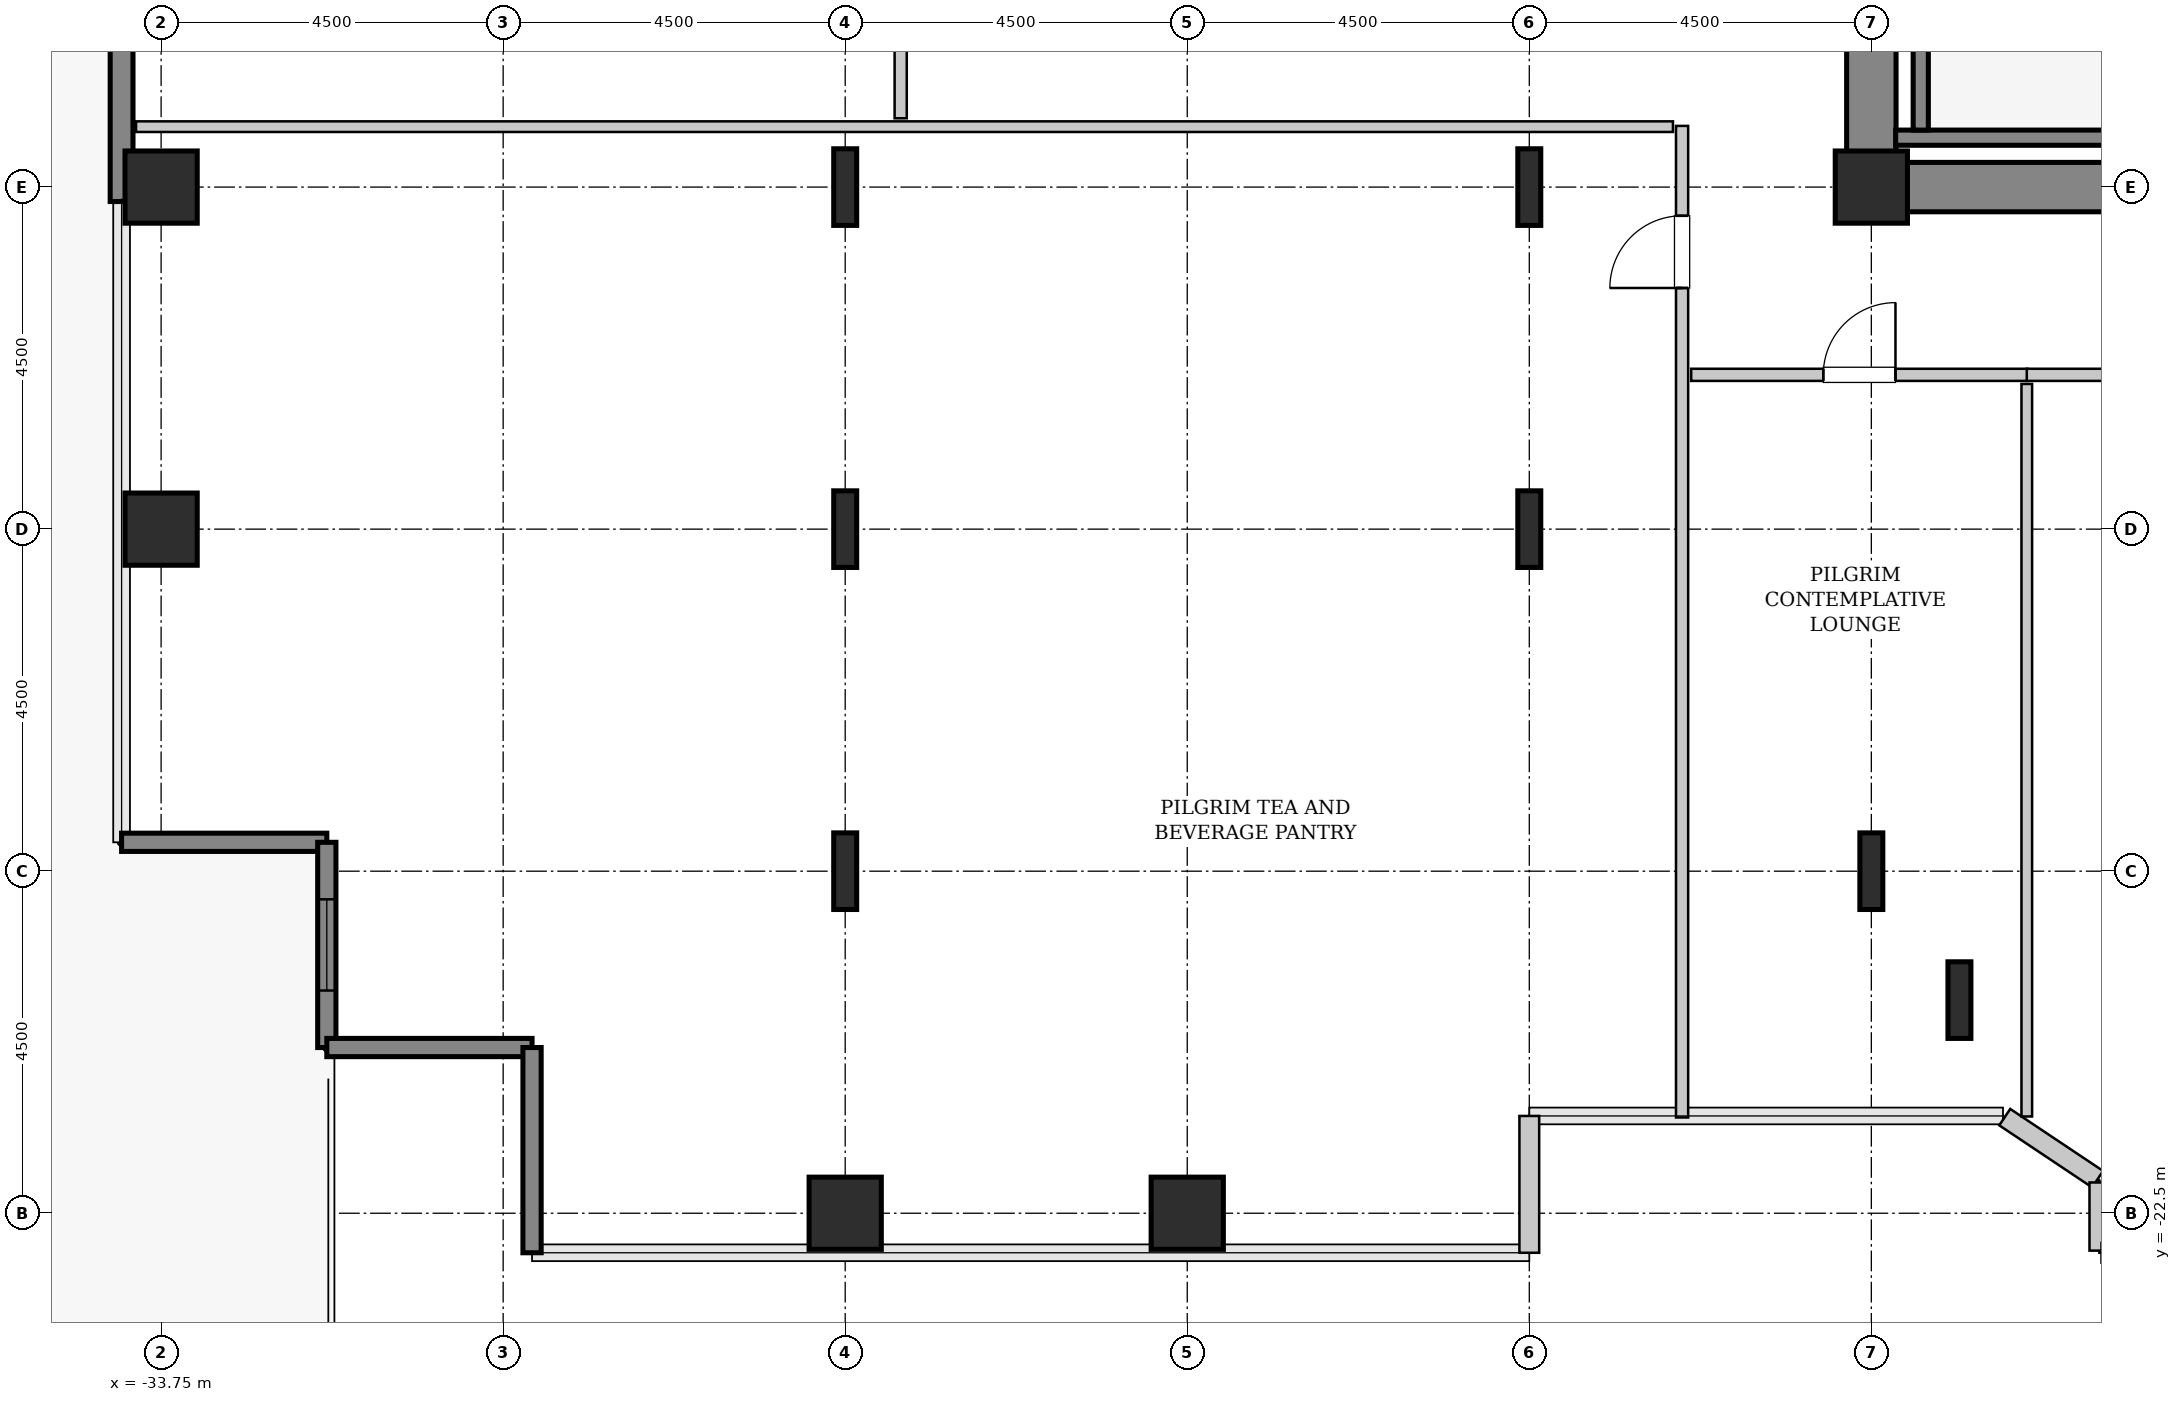
"""IFC4 building model, lengths in metres.
Left out: names, types, materials, properties, quantities, classifications, styles, units other than length and angle.
Written with IfcOpenShell. Run it as: python <this file> out.ifc"""

import sys

from ifc_helpers import new_model, si_unit, direction, frame, frame_2d, origin, origin_2d, place, context, subcontext, project, spatial, rectangle, hollow_rectangle, i_section, extrude, source, transform, mapped, element, fill, save


model = new_model("IFC4")
c1 = context("Model", 3, precision=1e-05, world=origin(), true_north=direction((0.0, 1.0)))
c2 = subcontext(c1, "Body", "Model", "MODEL_VIEW")
j1 = project(units=[si_unit("LENGTHUNIT", "METRE"), si_unit("PLANEANGLEUNIT", "RADIAN")], contexts=[c1])
p1 = place(None, origin())
s1 = spatial("IfcSite", under=j1, at=p1, CompositionType="ELEMENT")
p2 = place(p1, origin())
s2 = spatial("IfcBuilding", under=s1, at=p2, CompositionType="ELEMENT")
p3 = place(p2, frame((0.0, 0.0, 33.0)))
s3 = spatial("IfcBuildingStorey", under=s2, at=p3, CompositionType="ELEMENT", Elevation=33.0)
m1 = source(origin(), c2, "Body", "SweptSolid", [
    extrude(rectangle(XDim=10.025, YDim=0.65, at=frame_2d((5.012, 0.0))), origin(), (0.0, 0.0, 1.0), 3.8),
])
p4 = place(p3, frame((-11.575, -9.0, 0.0), z_axis=(0.0, 0.0, 1.0), x_axis=(1.0, 0.0, 0.0)))
e1 = element("IfcWall", 1, at=p4, inside=s3, PredefinedType="SHEAR", context=c2, shape_type="MappedRepresentation", body=[
    mapped(m1, transform((0.0, 0.0, 0.0), x_axis=(1.0, 0.0, 0.0), y_axis=(0.0, 1.0, 0.0), z_axis=(0.0, 0.0, 1.0), scale=1.0)),
])
m2 = source(origin(), c2, "Body", "SweptSolid", [
    extrude(rectangle(XDim=7.325, YDim=0.65, at=frame_2d((3.663, 0.0))), origin(), (0.0, 0.0, 1.0), 3.8),
])
p5 = place(p3, frame((-11.25, -8.675, 0.0), z_axis=(0.0, 0.0, 1.0), x_axis=(0.0, 1.0, 0.0)))
e2 = element("IfcWall", 2, at=p5, inside=s3, PredefinedType="SHEAR", context=c2, shape_type="MappedRepresentation", body=[
    mapped(m2, transform((0.0, 0.0, 0.0), x_axis=(1.0, 0.0, 0.0), y_axis=(0.0, 1.0, 0.0), z_axis=(0.0, 0.0, 1.0), scale=1.0)),
])
m3 = source(origin(), c2, "Body", "SweptSolid", [
    extrude(hollow_rectangle(XDim=0.95, YDim=0.95, WallThickness=0.045, InnerFilletRadius=0.045, OuterFilletRadius=0.09, at=origin_2d()), origin(), (0.0, 0.0, 1.0), 3.8),
])
for number, where, z_axis, x_axis in (
    (3, (-33.75, -13.5, 0.0), (0.0, 0.0, 1.0), (1.0, 0.0, 0.0)),
    (4, (-33.75, -9.0, 0.0), (0.0, 0.0, 1.0), (1.0, 0.0, 0.0)),
    (5, (-24.75, -22.5, 0.0), (0.0, 0.0, 1.0), (1.0, 0.0, 0.0)),
):
    element("IfcColumn", number, at=place(p3, frame(where, z_axis=z_axis, x_axis=x_axis)), inside=s3, PredefinedType="COLUMN", context=c2, shape_type="MappedRepresentation", body=[
        mapped(m3, transform((0.0, 0.0, 0.0), x_axis=(1.0, 0.0, 0.0), y_axis=(0.0, 1.0, 0.0), z_axis=(0.0, 0.0, 1.0), scale=1.0)),
    ])
m4 = source(origin(), c2, "Body", "SweptSolid", [
    extrude(i_section(OverallWidth=0.302, OverallDepth=1.008, WebThickness=0.021, FlangeThickness=0.04, FilletRadius=0.03, at=origin_2d()), origin(), (0.0, 0.0, 1.0), 3.8),
])
for number, where, z_axis, x_axis in (
    (6, (-24.75, -18.0, 0.0), (0.0, 0.0, 1.0), (1.0, 0.0, 0.0)),
    (7, (-24.75, -13.5, 0.0), (0.0, 0.0, 1.0), (1.0, 0.0, 0.0)),
    (8, (-24.75, -9.0, 0.0), (0.0, 0.0, 1.0), (1.0, 0.0, 0.0)),
):
    element("IfcColumn", number, at=place(p3, frame(where, z_axis=z_axis, x_axis=x_axis)), inside=s3, PredefinedType="COLUMN", context=c2, shape_type="MappedRepresentation", body=[
        mapped(m4, transform((0.0, 0.0, 0.0), x_axis=(1.0, 0.0, 0.0), y_axis=(0.0, 1.0, 0.0), z_axis=(0.0, 0.0, 1.0), scale=1.0)),
    ])
p6 = place(p3, frame((-20.25, -22.5, 0.0), z_axis=(0.0, 0.0, 1.0), x_axis=(1.0, 0.0, 0.0)))
e9 = element("IfcColumn", 9, at=p6, inside=s3, PredefinedType="COLUMN", context=c2, shape_type="MappedRepresentation", body=[
    mapped(m3, transform((0.0, 0.0, 0.0), x_axis=(1.0, 0.0, 0.0), y_axis=(0.0, 1.0, 0.0), z_axis=(0.0, 0.0, 1.0), scale=1.0)),
])
for number, where, z_axis, x_axis in (
    (10, (-15.75, -13.5, 0.0), (0.0, 0.0, 1.0), (1.0, 0.0, 0.0)),
    (11, (-15.75, -9.0, 0.0), (0.0, 0.0, 1.0), (1.0, 0.0, 0.0)),
    (12, (-11.25, -18.0, 0.0), (0.0, 0.0, 1.0), (1.0, 0.0, 0.0)),
):
    element("IfcColumn", number, at=place(p3, frame(where, z_axis=z_axis, x_axis=x_axis)), inside=s3, PredefinedType="COLUMN", context=c2, shape_type="MappedRepresentation", body=[
        mapped(m4, transform((0.0, 0.0, 0.0), x_axis=(1.0, 0.0, 0.0), y_axis=(0.0, 1.0, 0.0), z_axis=(0.0, 0.0, 1.0), scale=1.0)),
    ])
m5 = source(origin(), c2, "Body", "SweptSolid", [
    extrude(hollow_rectangle(XDim=0.95, YDim=0.95, WallThickness=0.045, InnerFilletRadius=0.045, OuterFilletRadius=0.09, at=origin_2d()), origin(), (0.0, 0.0, 1.0), 3.8),
])
p7 = place(p3, frame((-11.25, -9.0, 0.0), z_axis=(0.0, 0.0, 1.0), x_axis=(1.0, 0.0, 0.0)))
e13 = element("IfcColumn", 13, at=p7, inside=s3, PredefinedType="COLUMN", context=c2, shape_type="MappedRepresentation", body=[
    mapped(m5, transform((0.0, 0.0, 0.0), x_axis=(1.0, 0.0, 0.0), y_axis=(0.0, 1.0, 0.0), z_axis=(0.0, 0.0, 1.0), scale=1.0)),
])
p8 = place(p3, frame((-10.091, -19.696, 0.0), z_axis=(0.0, 0.0, 1.0), x_axis=(1.0, 0.0, 0.0)))
e14 = element("IfcColumn", 14, at=p8, inside=s3, PredefinedType="COLUMN", context=c2, shape_type="MappedRepresentation", body=[
    mapped(m4, transform((0.0, 0.0, 0.0), x_axis=(1.0, 0.0, 0.0), y_axis=(0.0, 1.0, 0.0), z_axis=(0.0, 0.0, 1.0), scale=1.0)),
])
m6 = source(origin(), c2, "Body", "SweptSolid", [
    extrude(rectangle(XDim=4.88, YDim=0.3, at=frame_2d((2.44, 0.0))), origin(), (0.0, 0.0, 1.0), 3.55),
])
p9 = place(p3, frame((-34.27, -9.19, 0.0), z_axis=(0.0, 0.0, 1.0), x_axis=(0.0, 1.0, 0.0)))
e15 = element("IfcWall", 15, at=p9, inside=s3, PredefinedType="SHEAR", context=c2, shape_type="MappedRepresentation", body=[
    mapped(m6, transform((0.0, 0.0, 0.0), x_axis=(1.0, 0.0, 0.0), y_axis=(0.0, 1.0, 0.0), z_axis=(0.0, 0.0, 1.0), scale=1.0)),
])
m7 = source(origin(), c2, "Body", "SweptSolid", [
    extrude(rectangle(XDim=2.7, YDim=0.24, at=frame_2d((1.35, 0.0))), origin(), (0.0, 0.0, 1.0), 3.55),
])
p10 = place(p3, frame((-34.27, -17.62, 0.0), z_axis=(0.0, 0.0, 1.0), x_axis=(1.0, 0.0, 0.0)))
e16 = element("IfcWall", 16, at=p10, inside=s3, PredefinedType="SHEAR", context=c2, shape_type="MappedRepresentation", body=[
    mapped(m7, transform((0.0, 0.0, 0.0), x_axis=(1.0, 0.0, 0.0), y_axis=(0.0, 1.0, 0.0), z_axis=(0.0, 0.0, 1.0), scale=1.0)),
])
p11 = place(p3, frame((-31.57, -17.62, 0.0), z_axis=(0.0, 0.0, 1.0), x_axis=(0.0, -1.0, 0.0)))
e17 = element("IfcWall", 17, at=p11, inside=s3, PredefinedType="SHEAR", context=c2, shape_type="MappedRepresentation", body=[
    mapped(m7, transform((0.0, 0.0, 0.0), x_axis=(1.0, 0.0, 0.0), y_axis=(0.0, 1.0, 0.0), z_axis=(0.0, 0.0, 1.0), scale=1.0)),
])
p12 = place(p11, frame((0.75, 0.0, 0.85)))
e18 = element("IfcOpeningElement", 18, at=p12, cuts=e17, PredefinedType="OPENING", context=c2, shape_type="SweptSolid", body=[
    extrude(rectangle(XDim=1.2, YDim=1.8, at=frame_2d((0.6, 0.9))), frame((0.0, 0.13, 0.0), z_axis=(0.0, -1.0, 0.0), x_axis=(1.0, 0.0, 0.0)), (0.0, 0.0, 1.0), 0.26),
])
for number, where, z_axis, x_axis in (
    (19, (-31.57, -20.32, 0.0), (0.0, 0.0, 1.0), (1.0, 0.0, 0.0)),
    (20, (-28.87, -20.32, 0.0), (0.0, 0.0, 1.0), (0.0, -1.0, 0.0)),
):
    element("IfcWall", number, at=place(p3, frame(where, z_axis=z_axis, x_axis=x_axis)), inside=s3, PredefinedType="SHEAR", context=c2, shape_type="MappedRepresentation", body=[
        mapped(m7, transform((0.0, 0.0, 0.0), x_axis=(1.0, 0.0, 0.0), y_axis=(0.0, 1.0, 0.0), z_axis=(0.0, 0.0, 1.0), scale=1.0)),
    ])
m8 = source(origin(), c2, "Body", "SweptSolid", [
    extrude(rectangle(XDim=1.8, YDim=0.26, at=frame_2d((0.9, 0.0))), origin(), (0.0, 0.0, 1.0), 3.55),
])
p13 = place(p3, frame((-15.75, -23.02, 0.0), z_axis=(0.0, 0.0, 1.0), x_axis=(0.0, 1.0, 0.0)))
e21 = element("IfcWall", 21, at=p13, inside=s3, PredefinedType="SOLIDWALL", context=c2, shape_type="MappedRepresentation", body=[
    mapped(m8, transform((0.0, 0.0, 0.0), x_axis=(1.0, 0.0, 0.0), y_axis=(0.0, 1.0, 0.0), z_axis=(0.0, 0.0, 1.0), scale=1.0)),
])
m9 = source(origin(), c2, "Body", "SweptSolid", [
    extrude(rectangle(XDim=1.469, YDim=0.26, at=frame_2d((0.734, 0.0))), origin(), (0.0, 0.0, 1.0), 3.55),
])
p14 = place(p3, frame((-9.495, -21.236, 0.0), z_axis=(0.0, 0.0, 1.0), x_axis=(0.831461760506, -0.555581983884, 0.0)))
e22 = element("IfcWall", 22, at=p14, inside=s3, PredefinedType="SOLIDWALL", context=c2, shape_type="MappedRepresentation", body=[
    mapped(m9, transform((0.0, 0.0, 0.0), x_axis=(1.0, 0.0, 0.0), y_axis=(0.0, 1.0, 0.0), z_axis=(0.0, 0.0, 1.0), scale=1.0)),
])
m10 = source(origin(), c2, "Body", "SweptSolid", [
    extrude(rectangle(XDim=0.897, YDim=0.26, at=frame_2d((0.448, 0.0))), origin(), (0.0, 0.0, 1.0), 3.55),
])
p15 = place(p3, frame((-8.25, -22.095, 0.0), z_axis=(0.0, 0.0, 1.0), x_axis=(0.0, -1.0, 0.0)))
e23 = element("IfcWall", 23, at=p15, inside=s3, PredefinedType="SOLIDWALL", context=c2, shape_type="MappedRepresentation", body=[
    mapped(m10, transform((0.0, 0.0, 0.0), x_axis=(1.0, 0.0, 0.0), y_axis=(0.0, 1.0, 0.0), z_axis=(0.0, 0.0, 1.0), scale=1.0)),
])
m11 = source(origin(), c2, "Body", "SweptSolid", [
    extrude(rectangle(XDim=3.63, YDim=0.2, at=frame_2d((1.815, 0.0))), origin(), (0.0, 0.0, 1.0), 3.8),
])
p16 = place(p3, frame((-10.93, -8.35, 0.0), z_axis=(0.0, 0.0, 1.0), x_axis=(1.0, 0.0, 0.0)))
e24 = element("IfcWall", 24, at=p16, inside=s3, PredefinedType="SOLIDWALL", context=c2, shape_type="MappedRepresentation", body=[
    mapped(m11, transform((0.0, 0.0, 0.0), x_axis=(1.0, 0.0, 0.0), y_axis=(0.0, 1.0, 0.0), z_axis=(0.0, 0.0, 1.0), scale=1.0)),
])
m12 = source(origin(), c2, "Body", "SweptSolid", [
    extrude(rectangle(XDim=7.1, YDim=0.2, at=frame_2d((3.55, 0.0))), origin(), (0.0, 0.0, 1.0), 3.8),
])
p17 = place(p3, frame((-10.6, -1.15, 0.0), z_axis=(0.0, 0.0, 1.0), x_axis=(0.0, -1.0, 0.0)))
e25 = element("IfcWall", 25, at=p17, inside=s3, PredefinedType="SOLIDWALL", context=c2, shape_type="MappedRepresentation", body=[
    mapped(m12, transform((0.0, 0.0, 0.0), x_axis=(1.0, 0.0, 0.0), y_axis=(0.0, 1.0, 0.0), z_axis=(0.0, 0.0, 1.0), scale=1.0)),
])
m13 = source(origin(), c2, "Body", "SweptSolid", [
    extrude(rectangle(XDim=13.045, YDim=0.16, at=frame_2d((6.522, 0.0))), origin(), (0.0, 0.0, 1.0), 3.535),
])
p18 = place(p3, frame((-13.74, -21.24, 0.0), z_axis=(0.0, 0.0, 1.0), x_axis=(0.0, 1.0, 0.0)))
e26 = element("IfcWall", 26, at=p18, inside=s3, PredefinedType="PARTITIONING", context=c2, shape_type="MappedRepresentation", body=[
    mapped(m13, transform((0.0, 0.0, 0.0), x_axis=(1.0, 0.0, 0.0), y_axis=(0.0, 1.0, 0.0), z_axis=(0.0, 0.0, 1.0), scale=1.0)),
])
p19 = place(p18, frame((10.913, 0.0, 0.0)))
e27 = element("IfcOpeningElement", 27, at=p19, cuts=e26, PredefinedType="OPENING", context=c2, shape_type="SweptSolid", body=[
    extrude(rectangle(XDim=0.95, YDim=2.1, at=frame_2d((0.475, 1.05))), frame((0.0, 0.09, 0.0), z_axis=(0.0, -1.0, 0.0), x_axis=(1.0, 0.0, 0.0)), (0.0, 0.0, 1.0), 0.18),
])
m14 = source(origin(), c2, "Body", "SweptSolid", [
    extrude(rectangle(XDim=20.22, YDim=0.14, at=frame_2d((10.11, 0.0))), origin(), (0.0, 0.0, 1.0), 3.535),
])
p20 = place(p3, frame((-34.08, -8.205, 0.0), z_axis=(0.0, 0.0, 1.0), x_axis=(1.0, 0.0, 0.0)))
e28 = element("IfcWall", 28, at=p20, inside=s3, PredefinedType="PARTITIONING", context=c2, shape_type="MappedRepresentation", body=[
    mapped(m14, transform((0.0, 0.0, 0.0), x_axis=(1.0, 0.0, 0.0), y_axis=(0.0, 1.0, 0.0), z_axis=(0.0, 0.0, 1.0), scale=1.0)),
])
m15 = source(origin(), c2, "Body", "SweptSolid", [
    extrude(rectangle(XDim=13.18, YDim=0.16, at=frame_2d((6.59, 0.0))), origin(), (0.0, 0.0, 1.0), 3.535),
])
p21 = place(p3, frame((-24.02, -8.095, 0.0), z_axis=(0.0, 0.0, 1.0), x_axis=(0.0, 1.0, 0.0)))
e29 = element("IfcWall", 29, at=p21, inside=s3, PredefinedType="PARTITIONING", context=c2, shape_type="MappedRepresentation", body=[
    mapped(m15, transform((0.0, 0.0, 0.0), x_axis=(1.0, 0.0, 0.0), y_axis=(0.0, 1.0, 0.0), z_axis=(0.0, 0.0, 1.0), scale=1.0)),
])
p22 = place(p21, frame((5.37, 0.0, 0.0)))
e30 = element("IfcOpeningElement", 30, at=p22, cuts=e29, PredefinedType="OPENING", context=c2, shape_type="SweptSolid", body=[
    extrude(rectangle(XDim=0.95, YDim=2.1, at=frame_2d((0.475, 1.05))), frame((0.0, 0.09, 0.0), z_axis=(0.0, -1.0, 0.0), x_axis=(1.0, 0.0, 0.0)), (0.0, 0.0, 1.0), 0.18),
])
m16 = source(origin(), c2, "Body", "SweptSolid", [
    extrude(rectangle(XDim=4.425, YDim=0.16, at=frame_2d((2.212, 0.0))), origin(), (0.0, 0.0, 1.0), 3.535),
])
p23 = place(p3, frame((-13.62, -11.47, 0.0), z_axis=(0.0, 0.0, 1.0), x_axis=(1.0, 0.0, 0.0)))
e31 = element("IfcWall", 31, at=p23, inside=s3, PredefinedType="PARTITIONING", context=c2, shape_type="MappedRepresentation", body=[
    mapped(m16, transform((0.0, 0.0, 0.0), x_axis=(1.0, 0.0, 0.0), y_axis=(0.0, 1.0, 0.0), z_axis=(0.0, 0.0, 1.0), scale=1.0)),
])
p24 = place(p23, frame((1.738, 0.0, 0.0)))
e32 = element("IfcOpeningElement", 32, at=p24, cuts=e31, PredefinedType="OPENING", context=c2, shape_type="SweptSolid", body=[
    extrude(rectangle(XDim=0.95, YDim=2.1, at=frame_2d((0.475, 1.05))), frame((0.0, 0.09, 0.0), z_axis=(0.0, -1.0, 0.0), x_axis=(1.0, 0.0, 0.0)), (0.0, 0.0, 1.0), 0.18),
])
m17 = source(origin(), c2, "Body", "SweptSolid", [
    extrude(rectangle(XDim=9.637, YDim=0.14, at=frame_2d((4.818, 0.0))), origin(), (0.0, 0.0, 1.0), 3.535),
])
p25 = place(p3, frame((-9.205, -21.227, 0.0), z_axis=(0.0, 0.0, 1.0), x_axis=(0.0, 1.0, 0.0)))
e33 = element("IfcWall", 33, at=p25, inside=s3, PredefinedType="PARTITIONING", context=c2, shape_type="MappedRepresentation", body=[
    mapped(m17, transform((0.0, 0.0, 0.0), x_axis=(1.0, 0.0, 0.0), y_axis=(0.0, 1.0, 0.0), z_axis=(0.0, 0.0, 1.0), scale=1.0)),
])
m18 = source(origin(), c2, "Body", "SweptSolid", [
    extrude(rectangle(XDim=4.61, YDim=0.16, at=frame_2d((2.305, 0.0))), origin(), (0.0, 0.0, 1.0), 3.535),
])
p26 = place(p3, frame((-9.205, -11.47, 0.0), z_axis=(0.0, 0.0, 1.0), x_axis=(1.0, 0.0, 0.0)))
e34 = element("IfcWall", 34, at=p26, inside=s3, PredefinedType="PARTITIONING", context=c2, shape_type="MappedRepresentation", body=[
    mapped(m18, transform((0.0, 0.0, 0.0), x_axis=(1.0, 0.0, 0.0), y_axis=(0.0, 1.0, 0.0), z_axis=(0.0, 0.0, 1.0), scale=1.0)),
])
p27 = place(p26, frame((1.83, 0.0, 0.0)))
e35 = element("IfcOpeningElement", 35, at=p27, cuts=e34, PredefinedType="OPENING", context=c2, shape_type="SweptSolid", body=[
    extrude(rectangle(XDim=0.95, YDim=2.1, at=frame_2d((0.475, 1.05))), frame((0.0, 0.09, 0.0), z_axis=(0.0, -1.0, 0.0), x_axis=(1.0, 0.0, 0.0)), (0.0, 0.0, 1.0), 0.18),
])
m19 = source(origin(), c2, "Body", "SweptSolid", [
    extrude(rectangle(XDim=1.2, YDim=1.8, at=frame_2d((0.6, 0.9))), frame((0.0, 0.03, 0.0), z_axis=(0.0, -1.0, 0.0), x_axis=(1.0, 0.0, 0.0)), (0.0, 0.0, 1.0), 0.06),
])
p28 = place(p12, origin())
e36 = element("IfcWindow", 36, at=p28, inside=s3, PartitioningType="SINGLE_PANEL", PredefinedType="WINDOW", context=c2, shape_type="MappedRepresentation", body=[
    mapped(m19, transform((0.0, 0.0, 0.0), x_axis=(1.0, 0.0, 0.0), y_axis=(0.0, 1.0, 0.0), z_axis=(0.0, 0.0, 1.0), scale=1.0)),
])
fill(e18, e36)
m20 = source(origin(), c2, "Body", "SweptSolid", [
    extrude(rectangle(XDim=0.95, YDim=2.1, at=frame_2d((0.475, 1.05))), frame((0.0, 0.025, 0.0), z_axis=(0.0, -1.0, 0.0), x_axis=(1.0, 0.0, 0.0)), (0.0, 0.0, 1.0), 0.05),
])
p29 = place(p19, origin())
e37 = element("IfcDoor", 37, at=p29, inside=s3, OperationType="SINGLE_SWING_LEFT", PredefinedType="DOOR", context=c2, shape_type="MappedRepresentation", body=[
    mapped(m20, transform((0.0, 0.0, 0.0), x_axis=(1.0, 0.0, 0.0), y_axis=(0.0, 1.0, 0.0), z_axis=(0.0, 0.0, 1.0), scale=1.0)),
])
fill(e27, e37)
p30 = place(p24, origin())
e38 = element("IfcDoor", 38, at=p30, inside=s3, OperationType="SINGLE_SWING_RIGHT", PredefinedType="DOOR", context=c2, shape_type="MappedRepresentation", body=[
    mapped(m20, transform((0.0, 0.0, 0.0), x_axis=(1.0, 0.0, 0.0), y_axis=(0.0, 1.0, 0.0), z_axis=(0.0, 0.0, 1.0), scale=1.0)),
])
fill(e32, e38)
save(model, sys.argv[1])
